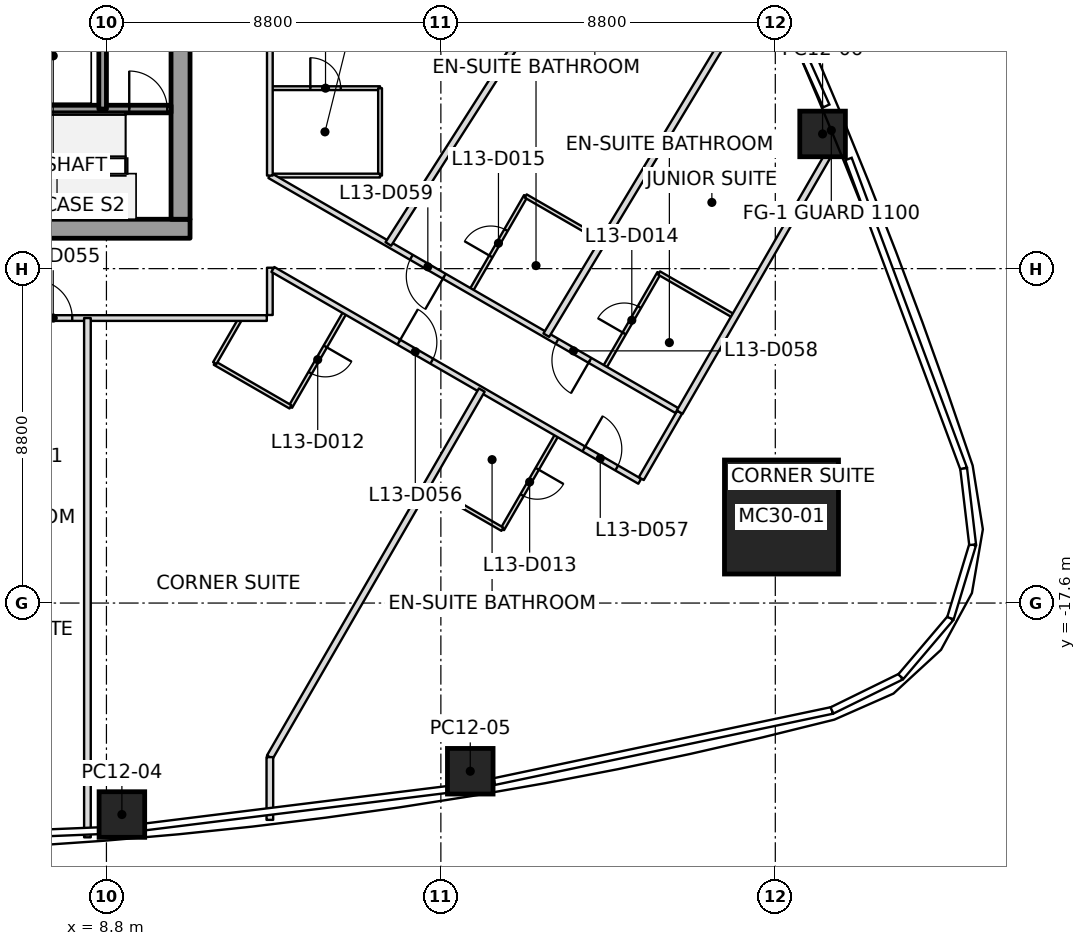
"""IFC4 building model, lengths in metres.
Left out: names, types, materials, properties, quantities, classifications, styles, units other than length and angle.
Written with IfcOpenShell. Run it as: python <this file> out.ifc"""

import sys

from ifc_helpers import new_model, si_unit, direction, frame, frame_2d, origin, origin_2d, place, context, subcontext, project, spatial, rectangle, extrude, clip, halfspace, element, fill, save


model = new_model("IFC4")
c1 = context("Model", 3, precision=1e-05, world=origin(), true_north=direction((0.0, 1.0)))
c2 = subcontext(c1, "Body", "Model", "MODEL_VIEW")
j1 = project(units=[si_unit("LENGTHUNIT", "METRE"), si_unit("PLANEANGLEUNIT", "RADIAN")], contexts=[c1])
p1 = place(None, origin())
s1 = spatial("IfcSite", under=j1, at=p1, CompositionType="ELEMENT")
p2 = place(p1, origin())
s2 = spatial("IfcBuilding", under=s1, at=p2, CompositionType="ELEMENT")
p3 = place(p2, frame((0.0, 0.0, 70.2)))
s3 = spatial("IfcBuildingStorey", under=s2, at=p3, CompositionType="ELEMENT", Elevation=70.2)
p4 = place(p3, frame((26.563, -15.336, 0.0), z_axis=(-0.030531992032, 0.017607001884, 0.999378702468), x_axis=(0.999533790055, 0.000537827582, 0.03052725469)))
e1 = element("IfcColumn", 1, at=p4, inside=s3, PredefinedType="COLUMN", context=c2, shape_type="SweptSolid", body=[
    extrude(rectangle(XDim=3.0, YDim=3.0, at=origin_2d()), origin(), (0.0, 0.0, 1.0), 3.702),
])
p5 = place(p3, frame((9.207, -23.165, 0.0), z_axis=(-0.009522132827, 0.151506264083, 0.988410431415), x_axis=(0.996564259393, 0.082765659269, -0.003085862396)))
e2 = element("IfcColumn", 2, at=p5, inside=s3, PredefinedType="COLUMN", context=c2, shape_type="SweptSolid", body=[
    clip(clip(extrude(rectangle(XDim=1.2, YDim=1.2, at=origin_2d()), origin(), (0.0, 0.0, 1.0), 3.743), halfspace(frame((0.0, 0.0, 0.018)), True)), halfspace(frame((0.0, 0.0, 3.725)), False)),
])
p6 = place(p3, frame((18.373, -22.026, 0.0), z_axis=(-0.019064832202, 0.117599222687, 0.992878116889), x_axis=(0.986248254133, 0.165269400969, -0.000637435354)))
e3 = element("IfcColumn", 3, at=p6, inside=s3, PredefinedType="COLUMN", context=c2, shape_type="SweptSolid", body=[
    clip(clip(extrude(rectangle(XDim=1.2, YDim=1.2, at=origin_2d()), origin(), (0.0, 0.0, 1.0), 3.727), halfspace(frame((0.0, 0.0, 0.015)), True)), halfspace(frame((0.0, 0.0, 3.712)), False)),
])
p7 = place(p3, frame((27.644, -5.255, 0.0), z_axis=(-0.019460655113, 0.011016709844, 0.999749926235), x_axis=(-0.381333758454, 0.9242697276, -0.017607819416)))
e4 = element("IfcColumn", 4, at=p7, inside=s3, PredefinedType="COLUMN", context=c2, shape_type="SweptSolid", body=[
    extrude(rectangle(XDim=1.2, YDim=1.2, at=origin_2d()), origin(), (0.0, 0.0, 1.0), 3.701),
])
p8 = place(p3, frame((-11.0, -7.75, 0.0), z_axis=(0.0, 0.0, 1.0), x_axis=(1.0, 0.0, 0.0)))
e5 = element("IfcWall", 5, at=p8, inside=s3, PredefinedType="SHEAR", context=c2, shape_type="SweptSolid", body=[
    extrude(rectangle(XDim=22.0, YDim=0.5, at=frame_2d((11.0, 0.0))), origin(), (0.0, 0.0, 1.0), 3.7),
])
p9 = place(p8, frame((10.45, 0.0, 0.0)))
e6 = element("IfcOpeningElement", 6, at=p9, cuts=e5, PredefinedType="OPENING", context=c2, shape_type="SweptSolid", body=[
    extrude(rectangle(XDim=1.1, YDim=2.1, at=frame_2d((0.55, 1.05))), frame((0.0, 0.25, 0.0), z_axis=(0.0, -1.0, 0.0), x_axis=(1.0, 0.0, 0.0)), (0.0, 0.0, 1.0), 0.5),
])
p10 = place(p3, frame((10.75, -7.5, 0.0), z_axis=(0.0, 0.0, 1.0), x_axis=(0.0, 1.0, 0.0)))
e7 = element("IfcWall", 7, at=p10, inside=s3, PredefinedType="SHEAR", context=c2, shape_type="SweptSolid", body=[
    extrude(rectangle(XDim=15.0, YDim=0.5, at=frame_2d((7.5, 0.0))), origin(), (0.0, 0.0, 1.0), 3.7),
])
p11 = place(p10, frame((6.6, 0.0, 0.0)))
e8 = element("IfcOpeningElement", 8, at=p11, cuts=e7, PredefinedType="OPENING", context=c2, shape_type="SweptSolid", body=[
    extrude(rectangle(XDim=1.8, YDim=2.1, at=frame_2d((0.9, 1.05))), frame((0.0, 0.25, 0.0), z_axis=(0.0, -1.0, 0.0), x_axis=(1.0, 0.0, 0.0)), (0.0, 0.0, 1.0), 0.5),
])
p12 = place(p3, frame((6.1, -4.6, 0.0), z_axis=(0.0, 0.0, 1.0), x_axis=(1.0, 0.0, 0.0)))
e9 = element("IfcWall", 9, at=p12, inside=s3, PredefinedType="SOLIDWALL", context=c2, shape_type="SweptSolid", body=[
    extrude(rectangle(XDim=2.6, YDim=0.2, at=frame_2d((1.3, 0.0))), origin(), (0.0, 0.0, 1.0), 3.55),
])
p13 = place(p3, frame((8.7, -4.6, 0.0), z_axis=(0.0, 0.0, 1.0), x_axis=(1.0, 0.0, 0.0)))
e10 = element("IfcWall", 10, at=p13, inside=s3, PredefinedType="SOLIDWALL", context=c2, shape_type="SweptSolid", body=[
    extrude(rectangle(XDim=1.8, YDim=0.2, at=frame_2d((0.9, 0.0))), origin(), (0.0, 0.0, 1.0), 3.55),
])
p14 = place(p13, frame((0.7, 0.0, 0.0)))
e11 = element("IfcOpeningElement", 11, at=p14, cuts=e10, PredefinedType="OPENING", context=c2, shape_type="SweptSolid", body=[
    extrude(rectangle(XDim=1.0, YDim=2.1, at=frame_2d((0.5, 1.05))), frame((0.0, 0.1, 0.0), z_axis=(0.0, -1.0, 0.0), x_axis=(1.0, 0.0, 0.0)), (0.0, 0.0, 1.0), 0.2),
])
p15 = place(p3, frame((8.7, -1.8, 0.0), z_axis=(0.0, 0.0, 1.0), x_axis=(0.0, -1.0, 0.0)))
e12 = element("IfcWall", 12, at=p15, inside=s3, PredefinedType="SOLIDWALL", context=c2, shape_type="SweptSolid", body=[
    extrude(rectangle(XDim=2.8, YDim=0.2, at=frame_2d((1.4, 0.0))), origin(), (0.0, 0.0, 1.0), 3.55),
])
p16 = place(p3, frame((8.3, -10.1, 0.0), z_axis=(0.0, 0.0, 1.0), x_axis=(0.0, -1.0, 0.0)))
e13 = element("IfcWall", 13, at=p16, inside=s3, PredefinedType="PARTITIONING", context=c2, shape_type="SweptSolid", body=[
    extrude(rectangle(XDim=13.665, YDim=0.175, at=frame_2d((6.833, 0.0))), origin(), (0.0, 0.0, 1.0), 2.784),
])
p17 = place(p3, frame((18.677, -11.995, 0.0), z_axis=(0.0, 0.0, 1.0), x_axis=(-0.499997843529, -0.86602664882, 0.0)))
e14 = element("IfcWall", 14, at=p17, inside=s3, PredefinedType="PARTITIONING", context=c2, shape_type="SweptSolid", body=[
    extrude(rectangle(XDim=11.153, YDim=0.175, at=frame_2d((5.576, 0.0))), origin(), (0.0, 0.0, 1.0), 3.0),
])
p18 = place(p3, frame((13.1, -21.654, 0.0), z_axis=(0.0, 0.0, 1.0), x_axis=(0.0, -1.0, 0.0)))
e15 = element("IfcWall", 15, at=p18, inside=s3, PredefinedType="PARTITIONING", context=c2, shape_type="SweptSolid", body=[
    extrude(rectangle(XDim=1.652, YDim=0.175, at=frame_2d((0.826, 0.0))), origin(), (0.0, 0.0, 1.0), 2.784),
])
p19 = place(p3, frame((23.851, 3.796, 0.0), z_axis=(0.0, 0.0, 1.0), x_axis=(-0.538388937406, -0.84269647684, 0.0)))
e16 = element("IfcWall", 16, at=p19, inside=s3, PredefinedType="PARTITIONING", context=c2, shape_type="SweptSolid", body=[
    extrude(rectangle(XDim=14.177, YDim=0.175, at=frame_2d((7.089, 0.0))), origin(), (0.0, 0.0, 1.0), 2.947),
])
p20 = place(p3, frame((20.375, -10.551, 0.0), z_axis=(0.0, 0.0, 1.0), x_axis=(0.51624063177, 0.856443582561, 0.0)))
e17 = element("IfcWall", 17, at=p20, inside=s3, PredefinedType="PARTITIONING", context=c2, shape_type="SweptSolid", body=[
    extrude(rectangle(XDim=11.084, YDim=0.175, at=frame_2d((5.542, 0.0))), origin(), (0.0, 0.0, 1.0), 2.934),
])
p21 = place(p3, frame((23.883, -12.577, 0.0), z_axis=(0.0, 0.0, 1.0), x_axis=(0.500021453979, 0.866013016969, 0.0)))
e18 = element("IfcWall", 18, at=p21, inside=s3, PredefinedType="PARTITIONING", context=c2, shape_type="SweptSolid", body=[
    extrude(rectangle(XDim=8.576, YDim=0.175, at=frame_2d((4.288, 0.0))), origin(), (0.0, 0.0, 1.0), 2.934),
])
p22 = place(p3, frame((-13.02, -10.1, 0.0), z_axis=(0.0, 0.0, 1.0), x_axis=(1.0, 0.0, 0.0)))
e19 = element("IfcWall", 19, at=p22, inside=s3, PredefinedType="PARTITIONING", context=c2, shape_type="SweptSolid", body=[
    extrude(rectangle(XDim=26.04, YDim=0.15, at=frame_2d((13.02, 0.0))), origin(), (0.0, 0.0, 1.0), 2.797),
])
p23 = place(p22, frame((7.32, 0.0, 0.0)))
e20 = element("IfcOpeningElement", 20, at=p23, cuts=e19, PredefinedType="OPENING", context=c2, shape_type="SweptSolid", body=[
    extrude(rectangle(XDim=1.0, YDim=2.1, at=frame_2d((0.5, 1.05))), frame((0.0, 0.075, 0.0), z_axis=(0.0, -1.0, 0.0), x_axis=(1.0, 0.0, 0.0)), (0.0, 0.0, 1.0), 0.15),
])
p24 = place(p22, frame((11.82, 0.0, 0.0)))
e21 = element("IfcOpeningElement", 21, at=p24, cuts=e19, PredefinedType="OPENING", context=c2, shape_type="SweptSolid", body=[
    extrude(rectangle(XDim=1.0, YDim=2.1, at=frame_2d((0.5, 1.05))), frame((0.0, 0.075, 0.0), z_axis=(0.0, -1.0, 0.0), x_axis=(1.0, 0.0, 0.0)), (0.0, 0.0, 1.0), 0.15),
])
p25 = place(p22, frame((14.82, 0.0, 0.0)))
e22 = element("IfcOpeningElement", 22, at=p25, cuts=e19, PredefinedType="OPENING", context=c2, shape_type="SweptSolid", body=[
    extrude(rectangle(XDim=1.0, YDim=2.1, at=frame_2d((0.5, 1.05))), frame((0.0, 0.075, 0.0), z_axis=(0.0, -1.0, 0.0), x_axis=(1.0, 0.0, 0.0)), (0.0, 0.0, 1.0), 0.15),
])
p26 = place(p22, frame((19.92, 0.0, 0.0)))
e23 = element("IfcOpeningElement", 23, at=p26, cuts=e19, PredefinedType="OPENING", context=c2, shape_type="SweptSolid", body=[
    extrude(rectangle(XDim=1.0, YDim=2.1, at=frame_2d((0.5, 1.05))), frame((0.0, 0.075, 0.0), z_axis=(0.0, -1.0, 0.0), x_axis=(1.0, 0.0, 0.0)), (0.0, 0.0, 1.0), 0.15),
])
p27 = place(p3, frame((13.1, -10.02, 0.0), z_axis=(0.0, 0.0, 1.0), x_axis=(0.0, 1.0, 0.0)))
e24 = element("IfcWall", 24, at=p27, inside=s3, PredefinedType="PARTITIONING", context=c2, shape_type="SweptSolid", body=[
    extrude(rectangle(XDim=1.244, YDim=0.15, at=frame_2d((0.622, 0.0))), origin(), (0.0, 0.0, 1.0), 2.797),
])
p28 = place(p3, frame((13.179, -8.822, 0.0), z_axis=(0.0, 0.0, 1.0), x_axis=(0.866032412198, -0.499987860876, 0.0)))
e25 = element("IfcWall", 25, at=p28, inside=s3, PredefinedType="PARTITIONING", context=c2, shape_type="SweptSolid", body=[
    extrude(rectangle(XDim=11.148, YDim=0.15, at=frame_2d((5.574, 0.0))), origin(), (0.0, 0.0, 1.0), 2.797),
])
p29 = place(p28, frame((3.828, 0.0, 0.0)))
e26 = element("IfcOpeningElement", 26, at=p29, cuts=e25, PredefinedType="OPENING", context=c2, shape_type="SweptSolid", body=[
    extrude(rectangle(XDim=1.0, YDim=2.1, at=frame_2d((0.5, 1.05))), frame((0.0, 0.075, 0.0), z_axis=(0.0, -1.0, 0.0), x_axis=(1.0, 0.0, 0.0)), (0.0, 0.0, 1.0), 0.15),
])
p30 = place(p28, frame((9.448, 0.0, 0.0)))
e27 = element("IfcOpeningElement", 27, at=p30, cuts=e25, PredefinedType="OPENING", context=c2, shape_type="SweptSolid", body=[
    extrude(rectangle(XDim=1.0, YDim=2.1, at=frame_2d((0.5, 1.05))), frame((0.0, 0.075, 0.0), z_axis=(0.0, -1.0, 0.0), x_axis=(1.0, 0.0, 0.0)), (0.0, 0.0, 1.0), 0.15),
])
p31 = place(p3, frame((22.873, -14.326, 0.0), z_axis=(0.0, 0.0, 1.0), x_axis=(0.500025864173, 0.866010470582, 0.0)))
e28 = element("IfcWall", 28, at=p31, inside=s3, PredefinedType="PARTITIONING", context=c2, shape_type="SweptSolid", body=[
    extrude(rectangle(XDim=2.02, YDim=0.15, at=frame_2d((1.01, 0.0))), origin(), (0.0, 0.0, 1.0), 2.797),
])
p32 = place(p3, frame((23.814, -12.537, 0.0), z_axis=(0.0, 0.0, 1.0), x_axis=(-0.86602554532, 0.499999754854, 0.0)))
e29 = element("IfcWall", 29, at=p32, inside=s3, PredefinedType="PARTITIONING", context=c2, shape_type="SweptSolid", body=[
    extrude(rectangle(XDim=12.372, YDim=0.15, at=frame_2d((6.186, 0.0))), origin(), (0.0, 0.0, 1.0), 2.947),
])
p33 = place(p32, frame((2.646, 0.0, 0.0)))
e30 = element("IfcOpeningElement", 30, at=p33, cuts=e29, PredefinedType="OPENING", context=c2, shape_type="SweptSolid", body=[
    extrude(rectangle(XDim=1.0, YDim=2.1, at=frame_2d((0.5, 1.05))), frame((0.0, 0.075, 0.0), z_axis=(0.0, -1.0, 0.0), x_axis=(1.0, 0.0, 0.0)), (0.0, 0.0, 1.0), 0.15),
])
p34 = place(p32, frame((7.072, 0.0, 0.0)))
e31 = element("IfcOpeningElement", 31, at=p34, cuts=e29, PredefinedType="OPENING", context=c2, shape_type="SweptSolid", body=[
    extrude(rectangle(XDim=1.0, YDim=2.1, at=frame_2d((0.5, 1.05))), frame((0.0, 0.075, 0.0), z_axis=(0.0, -1.0, 0.0), x_axis=(1.0, 0.0, 0.0)), (0.0, 0.0, 1.0), 0.15),
])
p35 = place(p3, frame((13.1, -6.351, 0.0), z_axis=(0.0, 0.0, 1.0), x_axis=(0.0, 1.0, 0.0)))
e32 = element("IfcWall", 32, at=p35, inside=s3, PredefinedType="PARTITIONING", context=c2, shape_type="SweptSolid", body=[
    extrude(rectangle(XDim=16.371, YDim=0.15, at=frame_2d((8.186, 0.0))), origin(), (0.0, 0.0, 1.0), 3.0),
])
p36 = place(p35, frame((7.125, 0.0, 0.0)))
e33 = element("IfcOpeningElement", 33, at=p36, cuts=e32, PredefinedType="OPENING", context=c2, shape_type="SweptSolid", body=[
    extrude(rectangle(XDim=1.0, YDim=2.1, at=frame_2d((0.5, 1.05))), frame((0.0, 0.075, 0.0), z_axis=(0.0, -1.0, 0.0), x_axis=(1.0, 0.0, 0.0)), (0.0, 0.0, 1.0), 0.15),
])
p37 = place(p35, frame((14.151, 0.0, 0.0)))
e34 = element("IfcOpeningElement", 34, at=p37, cuts=e32, PredefinedType="OPENING", context=c2, shape_type="SweptSolid", body=[
    extrude(rectangle(XDim=1.0, YDim=2.1, at=frame_2d((0.5, 1.05))), frame((0.0, 0.075, 0.0), z_axis=(0.0, -1.0, 0.0), x_axis=(1.0, 0.0, 0.0)), (0.0, 0.0, 1.0), 0.15),
])
p38 = place(p3, frame((15.077, -9.952, 0.0), z_axis=(0.0, 0.0, 1.0), x_axis=(-0.499999802827, -0.866025517622, 0.0)))
e35 = element("IfcWall", 35, at=p38, inside=s3, PredefinedType="PARTITIONING", context=c2, shape_type="SweptSolid", body=[
    extrude(rectangle(XDim=2.87, YDim=0.1, at=frame_2d((1.435, 0.0))), origin(), (0.0, 0.0, 1.0), 2.797),
])
p39 = place(p38, frame((1.035, 0.0, 0.0)))
e36 = element("IfcOpeningElement", 36, at=p39, cuts=e35, PredefinedType="OPENING", context=c2, shape_type="SweptSolid", body=[
    extrude(rectangle(XDim=0.8, YDim=2.1, at=frame_2d((0.4, 1.05))), frame((0.0, 0.05, 0.0), z_axis=(0.0, -1.0, 0.0), x_axis=(1.0, 0.0, 0.0)), (0.0, 0.0, 1.0), 0.1),
])
p40 = place(p3, frame((13.642, -12.437, 0.0), z_axis=(0.0, 0.0, 1.0), x_axis=(-0.866007057882, 0.500031774688, 0.0)))
e37 = element("IfcWall", 37, at=p40, inside=s3, PredefinedType="PARTITIONING", context=c2, shape_type="SweptSolid", body=[
    extrude(rectangle(XDim=2.3, YDim=0.1, at=frame_2d((1.15, 0.0))), origin(), (0.0, 0.0, 1.0), 2.867),
])
p41 = place(p3, frame((11.65, -11.287, 0.0), z_axis=(0.0, 0.0, 1.0), x_axis=(0.500049290317, 0.865996944136, 0.0)))
e38 = element("IfcWall", 38, at=p41, inside=s3, PredefinedType="PARTITIONING", context=c2, shape_type="SweptSolid", body=[
    extrude(rectangle(XDim=1.336, YDim=0.1, at=frame_2d((0.668, 0.0))), origin(), (0.0, 0.0, 1.0), 3.0),
])
p42 = place(p3, frame((13.13, -4.051, 0.0), z_axis=(0.0, 0.0, 1.0), x_axis=(1.0, 0.0, 0.0)))
e39 = element("IfcWall", 39, at=p42, inside=s3, PredefinedType="PARTITIONING", context=c2, shape_type="SweptSolid", body=[
    extrude(rectangle(XDim=2.87, YDim=0.1, at=frame_2d((1.435, 0.0))), origin(), (0.0, 0.0, 1.0), 3.0),
])
p43 = place(p42, frame((1.035, 0.0, 0.0)))
e40 = element("IfcOpeningElement", 40, at=p43, cuts=e39, PredefinedType="OPENING", context=c2, shape_type="SweptSolid", body=[
    extrude(rectangle(XDim=0.8, YDim=2.1, at=frame_2d((0.4, 1.05))), frame((0.0, 0.05, 0.0), z_axis=(0.0, -1.0, 0.0), x_axis=(1.0, 0.0, 0.0)), (0.0, 0.0, 1.0), 0.1),
])
p44 = place(p3, frame((16.0, -4.051, 0.0), z_axis=(0.0, 0.0, 1.0), x_axis=(0.0, -1.0, 0.0)))
e41 = element("IfcWall", 41, at=p44, inside=s3, PredefinedType="PARTITIONING", context=c2, shape_type="SweptSolid", body=[
    extrude(rectangle(XDim=2.3, YDim=0.1, at=frame_2d((1.15, 0.0))), origin(), (0.0, 0.0, 1.0), 2.947),
])
p45 = place(p3, frame((16.0, -6.351, 0.0), z_axis=(0.0, 0.0, 1.0), x_axis=(-1.0, 0.0, 0.0)))
e42 = element("IfcWall", 42, at=p45, inside=s3, PredefinedType="PARTITIONING", context=c2, shape_type="SweptSolid", body=[
    extrude(rectangle(XDim=2.84, YDim=0.1, at=frame_2d((1.42, 0.0))), origin(), (0.0, 0.0, 1.0), 2.947),
])
p46 = place(p3, frame((20.653, -13.171, 0.0), z_axis=(0.0, 0.0, 1.0), x_axis=(-0.499972835562, -0.866041086612, 0.0)))
e43 = element("IfcWall", 43, at=p46, inside=s3, PredefinedType="PARTITIONING", context=c2, shape_type="SweptSolid", body=[
    extrude(rectangle(XDim=2.87, YDim=0.1, at=frame_2d((1.435, 0.0))), origin(), (0.0, 0.0, 1.0), 3.0),
])
p47 = place(p46, frame((1.035, 0.0, 0.0)))
e44 = element("IfcOpeningElement", 44, at=p47, cuts=e43, PredefinedType="OPENING", context=c2, shape_type="SweptSolid", body=[
    extrude(rectangle(XDim=0.8, YDim=2.1, at=frame_2d((0.4, 1.05))), frame((0.0, 0.05, 0.0), z_axis=(0.0, -1.0, 0.0), x_axis=(1.0, 0.0, 0.0)), (0.0, 0.0, 1.0), 0.1),
])
p48 = place(p3, frame((19.219, -15.657, 0.0), z_axis=(0.0, 0.0, 1.0), x_axis=(-0.866044110172, 0.499967598186, 0.0)))
e45 = element("IfcWall", 45, at=p48, inside=s3, PredefinedType="PARTITIONING", context=c2, shape_type="SweptSolid", body=[
    extrude(rectangle(XDim=2.27, YDim=0.1, at=frame_2d((1.135, 0.0))), origin(), (0.0, 0.0, 1.0), 3.0),
])
p49 = place(p3, frame((18.398, -9.375, 0.0), z_axis=(0.0, 0.0, 1.0), x_axis=(0.499999802827, 0.866025517622, 0.0)))
e46 = element("IfcWall", 46, at=p49, inside=s3, PredefinedType="PARTITIONING", context=c2, shape_type="SweptSolid", body=[
    extrude(rectangle(XDim=2.87, YDim=0.1, at=frame_2d((1.435, 0.0))), origin(), (0.0, 0.0, 1.0), 3.0),
])
p50 = place(p49, frame((1.035, 0.0, 0.0)))
e47 = element("IfcOpeningElement", 47, at=p50, cuts=e46, PredefinedType="OPENING", context=c2, shape_type="SweptSolid", body=[
    extrude(rectangle(XDim=0.8, YDim=2.1, at=frame_2d((0.4, 1.05))), frame((0.0, 0.05, 0.0), z_axis=(0.0, -1.0, 0.0), x_axis=(1.0, 0.0, 0.0)), (0.0, 0.0, 1.0), 0.1),
])
p51 = place(p3, frame((19.833, -6.889, 0.0), z_axis=(0.0, 0.0, 1.0), x_axis=(0.866017224141, -0.500014167291, 0.0)))
e48 = element("IfcWall", 48, at=p51, inside=s3, PredefinedType="PARTITIONING", context=c2, shape_type="SweptSolid", body=[
    extrude(rectangle(XDim=2.27, YDim=0.1, at=frame_2d((1.135, 0.0))), origin(), (0.0, 0.0, 1.0), 3.0),
])
p52 = place(p3, frame((21.906, -11.401, 0.0), z_axis=(0.0, 0.0, 1.0), x_axis=(0.500036638401, 0.866004249561, 0.0)))
e49 = element("IfcWall", 49, at=p52, inside=s3, PredefinedType="PARTITIONING", context=c2, shape_type="SweptSolid", body=[
    extrude(rectangle(XDim=2.87, YDim=0.1, at=frame_2d((1.435, 0.0))), origin(), (0.0, 0.0, 1.0), 3.0),
])
p53 = place(p52, frame((1.035, 0.0, 0.0)))
e50 = element("IfcOpeningElement", 50, at=p53, cuts=e49, PredefinedType="OPENING", context=c2, shape_type="SweptSolid", body=[
    extrude(rectangle(XDim=0.8, YDim=2.1, at=frame_2d((0.4, 1.05))), frame((0.0, 0.05, 0.0), z_axis=(0.0, -1.0, 0.0), x_axis=(1.0, 0.0, 0.0)), (0.0, 0.0, 1.0), 0.1),
])
p54 = place(p3, frame((23.342, -8.915, 0.0), z_axis=(0.0, 0.0, 1.0), x_axis=(0.866044110172, -0.499967598186, 0.0)))
e51 = element("IfcWall", 51, at=p54, inside=s3, PredefinedType="PARTITIONING", context=c2, shape_type="SweptSolid", body=[
    extrude(rectangle(XDim=2.27, YDim=0.1, at=frame_2d((1.135, 0.0))), origin(), (0.0, 0.0, 1.0), 3.0),
])
p55 = place(p43, origin())
e52 = element("IfcDoor", 52, at=p55, inside=s3, OperationType="SINGLE_SWING_RIGHT", PredefinedType="DOOR", context=c2, shape_type="SweptSolid", body=[
    extrude(rectangle(XDim=0.8, YDim=2.1, at=frame_2d((0.4, 1.05))), frame((0.0, 0.025, 0.0), z_axis=(0.0, -1.0, 0.0), x_axis=(1.0, 0.0, 0.0)), (0.0, 0.0, 1.0), 0.05),
])
fill(e40, e52)
p56 = place(p26, origin())
e53 = element("IfcDoor", 53, at=p56, inside=s3, OperationType="SINGLE_SWING_LEFT", PredefinedType="DOOR", context=c2, shape_type="SweptSolid", body=[
    extrude(rectangle(XDim=1.0, YDim=2.1, at=frame_2d((0.5, 1.05))), frame((0.0, 0.025, 0.0), z_axis=(0.0, -1.0, 0.0), x_axis=(1.0, 0.0, 0.0)), (0.0, 0.0, 1.0), 0.05),
])
fill(e23, e53)
p57 = place(p29, origin())
e54 = element("IfcDoor", 54, at=p57, inside=s3, OperationType="SINGLE_SWING_LEFT", PredefinedType="DOOR", context=c2, shape_type="SweptSolid", body=[
    extrude(rectangle(XDim=1.0, YDim=2.1, at=frame_2d((0.5, 1.05))), frame((0.0, 0.025, 0.0), z_axis=(0.0, -1.0, 0.0), x_axis=(1.0, 0.0, 0.0)), (0.0, 0.0, 1.0), 0.05),
])
fill(e26, e54)
p58 = place(p39, origin())
e55 = element("IfcDoor", 55, at=p58, inside=s3, OperationType="SINGLE_SWING_LEFT", PredefinedType="DOOR", context=c2, shape_type="SweptSolid", body=[
    extrude(rectangle(XDim=0.8, YDim=2.1, at=frame_2d((0.4, 1.05))), frame((0.0, 0.025, 0.0), z_axis=(0.0, -1.0, 0.0), x_axis=(1.0, 0.0, 0.0)), (0.0, 0.0, 1.0), 0.05),
])
fill(e36, e55)
p59 = place(p30, origin())
e56 = element("IfcDoor", 56, at=p59, inside=s3, OperationType="SINGLE_SWING_LEFT", PredefinedType="DOOR", context=c2, shape_type="SweptSolid", body=[
    extrude(rectangle(XDim=1.0, YDim=2.1, at=frame_2d((0.5, 1.05))), frame((0.0, 0.025, 0.0), z_axis=(0.0, -1.0, 0.0), x_axis=(1.0, 0.0, 0.0)), (0.0, 0.0, 1.0), 0.05),
])
fill(e27, e56)
p60 = place(p47, origin())
e57 = element("IfcDoor", 57, at=p60, inside=s3, OperationType="SINGLE_SWING_LEFT", PredefinedType="DOOR", context=c2, shape_type="SweptSolid", body=[
    extrude(rectangle(XDim=0.8, YDim=2.1, at=frame_2d((0.4, 1.05))), frame((0.0, 0.025, 0.0), z_axis=(0.0, -1.0, 0.0), x_axis=(1.0, 0.0, 0.0)), (0.0, 0.0, 1.0), 0.05),
])
fill(e44, e57)
p61 = place(p33, origin())
e58 = element("IfcDoor", 58, at=p61, inside=s3, OperationType="SINGLE_SWING_LEFT", PredefinedType="DOOR", context=c2, shape_type="SweptSolid", body=[
    extrude(rectangle(XDim=1.0, YDim=2.1, at=frame_2d((0.5, 1.05))), frame((0.0, 0.025, 0.0), z_axis=(0.0, -1.0, 0.0), x_axis=(1.0, 0.0, 0.0)), (0.0, 0.0, 1.0), 0.05),
])
fill(e30, e58)
p62 = place(p53, origin())
e59 = element("IfcDoor", 59, at=p62, inside=s3, OperationType="SINGLE_SWING_LEFT", PredefinedType="DOOR", context=c2, shape_type="SweptSolid", body=[
    extrude(rectangle(XDim=0.8, YDim=2.1, at=frame_2d((0.4, 1.05))), frame((0.0, 0.025, 0.0), z_axis=(0.0, -1.0, 0.0), x_axis=(1.0, 0.0, 0.0)), (0.0, 0.0, 1.0), 0.05),
])
fill(e50, e59)
p63 = place(p34, origin())
e60 = element("IfcDoor", 60, at=p63, inside=s3, OperationType="SINGLE_SWING_LEFT", PredefinedType="DOOR", context=c2, shape_type="SweptSolid", body=[
    extrude(rectangle(XDim=1.0, YDim=2.1, at=frame_2d((0.5, 1.05))), frame((0.0, 0.025, 0.0), z_axis=(0.0, -1.0, 0.0), x_axis=(1.0, 0.0, 0.0)), (0.0, 0.0, 1.0), 0.05),
])
fill(e31, e60)
p64 = place(p50, origin())
e61 = element("IfcDoor", 61, at=p64, inside=s3, OperationType="SINGLE_SWING_RIGHT", PredefinedType="DOOR", context=c2, shape_type="SweptSolid", body=[
    extrude(rectangle(XDim=0.8, YDim=2.1, at=frame_2d((0.4, 1.05))), frame((0.0, 0.025, 0.0), z_axis=(0.0, -1.0, 0.0), x_axis=(1.0, 0.0, 0.0)), (0.0, 0.0, 1.0), 0.05),
])
fill(e47, e61)
p65 = place(p14, origin())
e62 = element("IfcDoor", 62, at=p65, inside=s3, OperationType="SINGLE_SWING_RIGHT", PredefinedType="DOOR", context=c2, shape_type="SweptSolid", body=[
    extrude(rectangle(XDim=1.0, YDim=2.1, at=frame_2d((0.5, 1.05))), frame((0.0, 0.025, 0.0), z_axis=(0.0, -1.0, 0.0), x_axis=(1.0, 0.0, 0.0)), (0.0, 0.0, 1.0), 0.05),
])
fill(e11, e62)
save(model, sys.argv[1])
